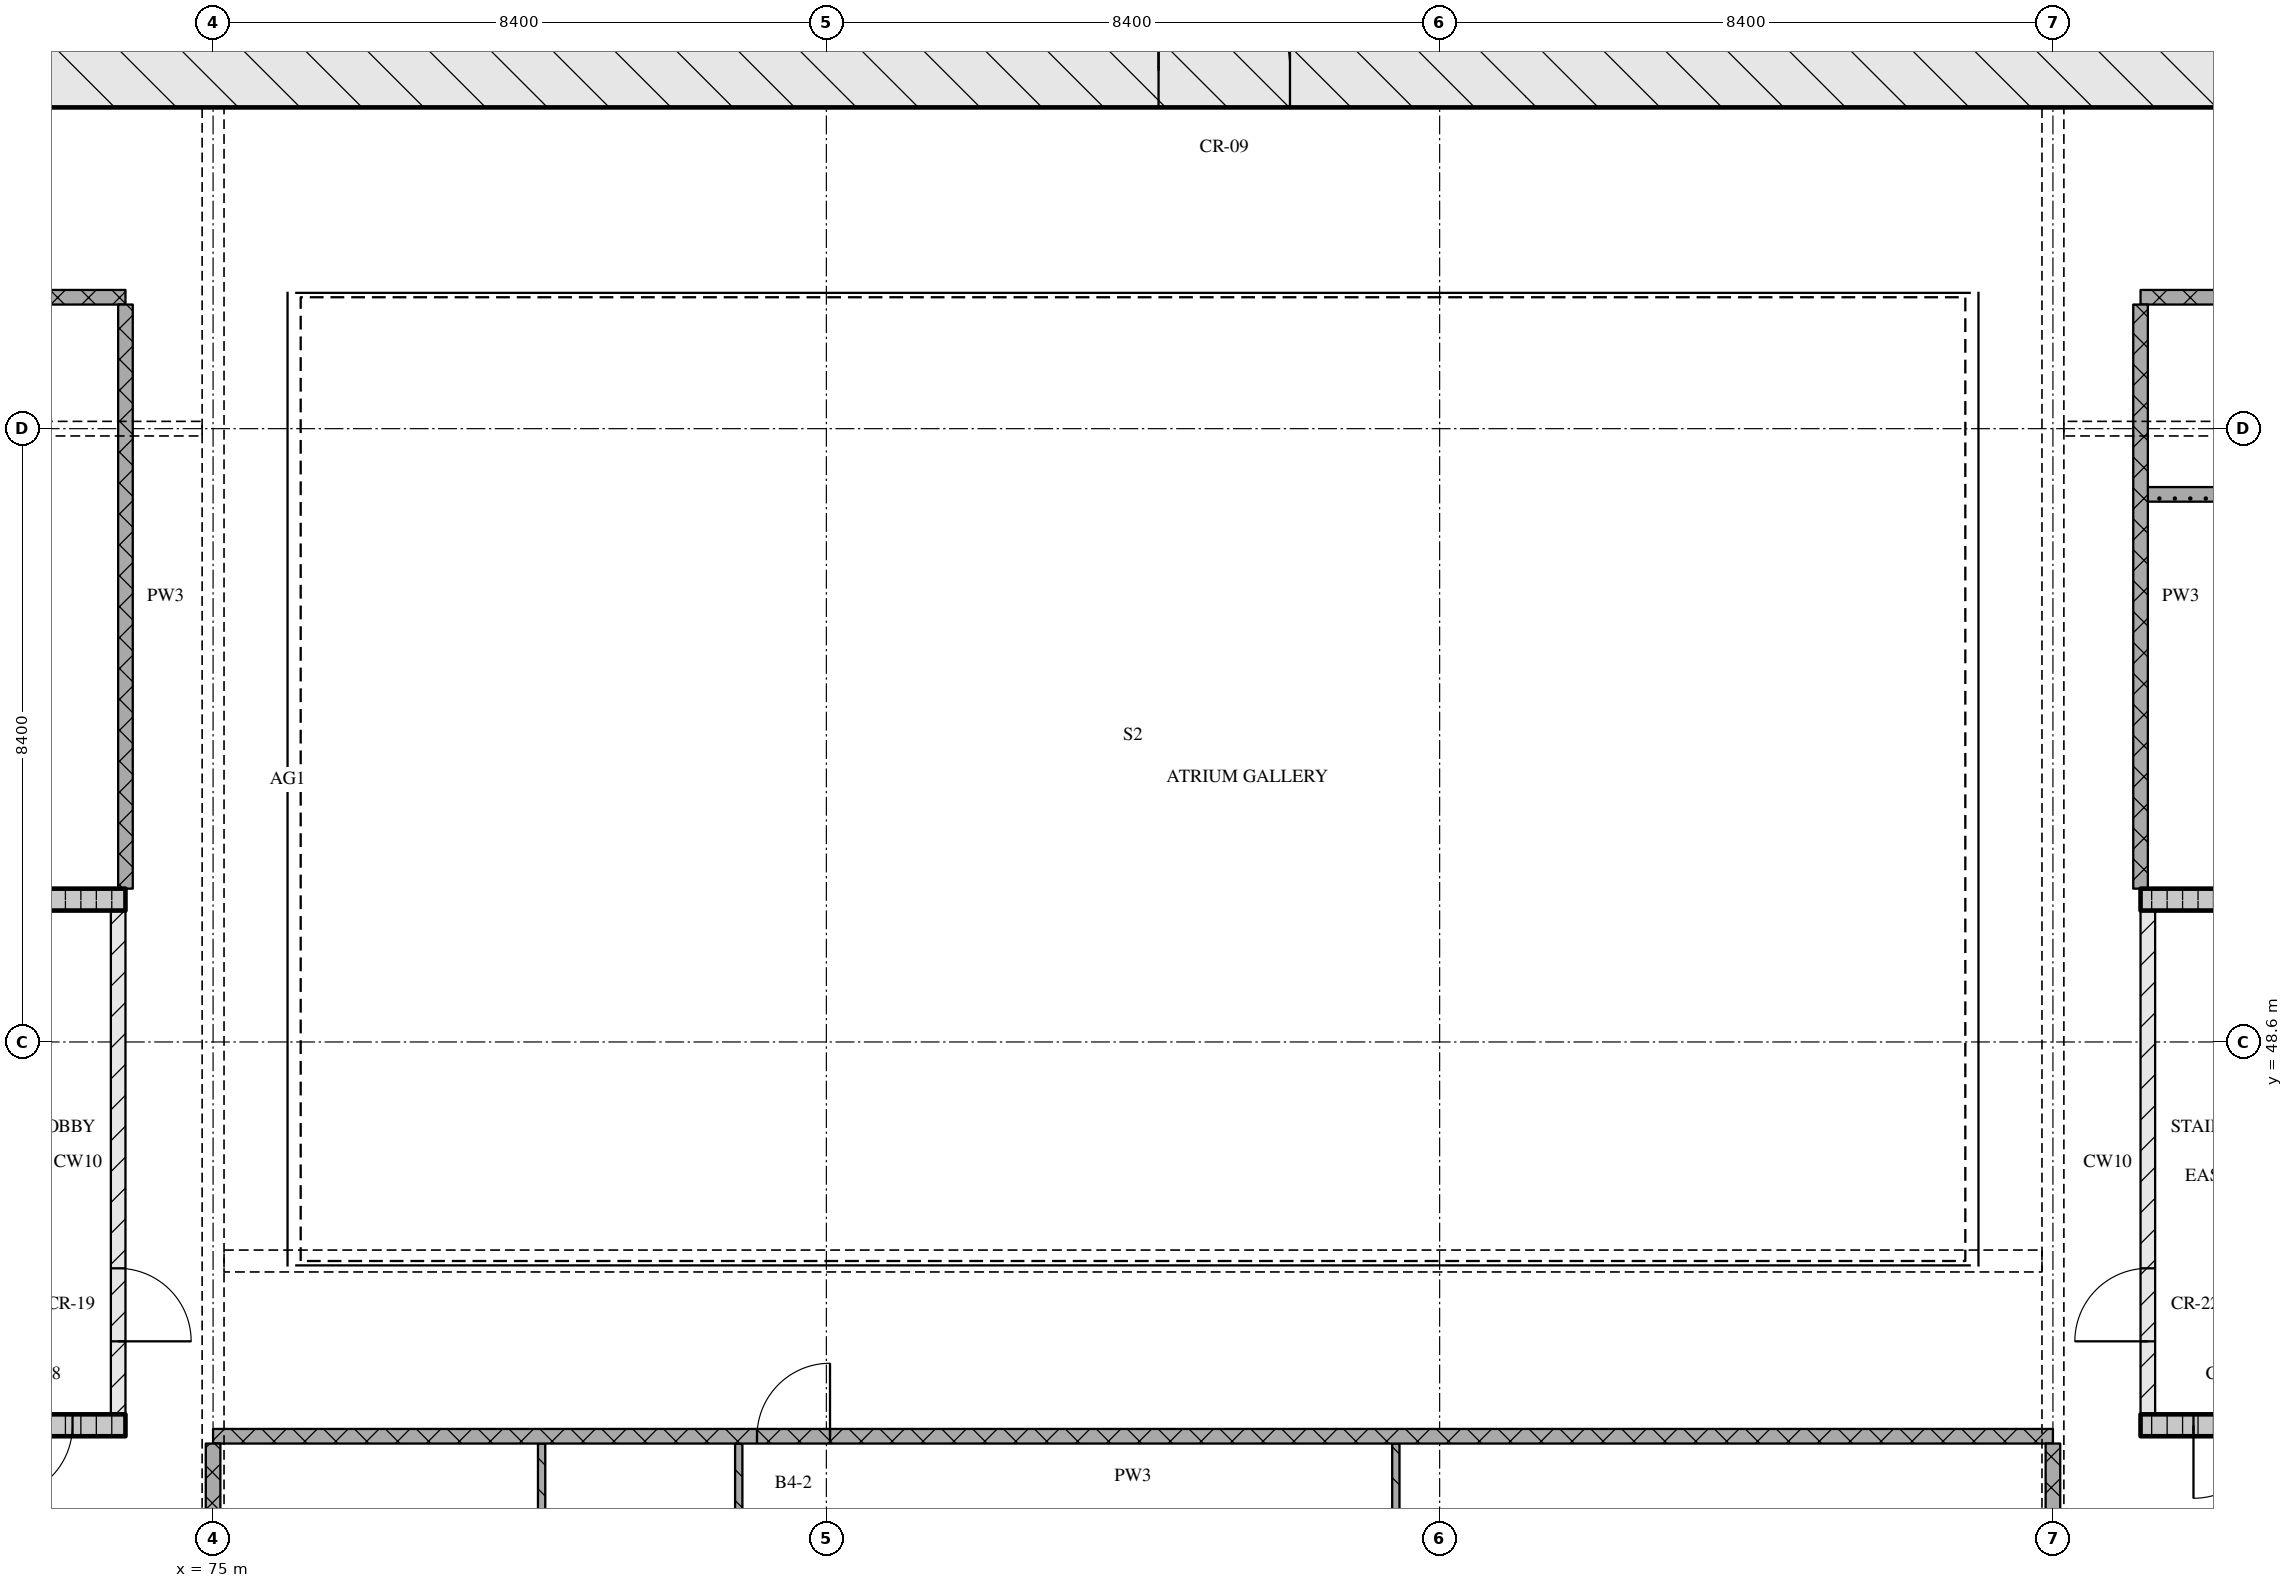
"""IFC4 building model, lengths in metres.
Left out: names, types, materials, properties, quantities, classifications, styles, units other than length and angle.
Written with IfcOpenShell. Run it as: python <this file> out.ifc"""

import sys

from ifc_helpers import new_model, si_unit, direction, frame, frame_2d, origin, place, context, subcontext, project, spatial, rectangle, extrude, element, fill, save


model = new_model("IFC4")
c1 = context("Model", 3, precision=1e-05, world=origin(), true_north=direction((0.0, 1.0)))
c2 = subcontext(c1, "Body", "Model", "MODEL_VIEW")
j1 = project(units=[si_unit("LENGTHUNIT", "METRE"), si_unit("PLANEANGLEUNIT", "RADIAN")], contexts=[c1])
p1 = place(None, origin())
s1 = spatial("IfcSite", under=j1, at=p1, CompositionType="ELEMENT")
p2 = place(p1, origin())
s2 = spatial("IfcBuilding", under=s1, at=p2, CompositionType="ELEMENT")
p3 = place(p2, frame((0.0, 0.0, 131.25)))
s3 = spatial("IfcBuildingStorey", under=s2, at=p3, CompositionType="ELEMENT", Elevation=131.25)
p4 = place(p3, frame((66.8, 61.9, 0.0), z_axis=(0.0, 0.0, 1.0), x_axis=(1.0, 0.0, 0.0)))
e1 = element("IfcWall", 1, at=p4, inside=s3, PredefinedType="SOLIDWALL", context=c2, shape_type="SweptSolid", body=[
    extrude(rectangle(XDim=41.6, YDim=1.0, at=frame_2d((20.8, 0.0))), origin(), (0.0, 0.0, 1.0), 3.32),
])
p5 = place(p4, frame((21.15, 0.0, 0.0)))
e2 = element("IfcOpeningElement", 2, at=p5, cuts=e1, PredefinedType="OPENING", context=c2, shape_type="SweptSolid", body=[
    extrude(rectangle(XDim=1.8, YDim=2.1, at=frame_2d((0.9, 1.05))), frame((0.0, 0.51, 0.0), z_axis=(0.0, -1.0, 0.0), x_axis=(1.0, 0.0, 0.0)), (0.0, 0.0, 1.0), 1.02),
])
p6 = place(p3, frame((68.2, 43.35, 0.0), z_axis=(0.0, 0.0, 1.0), x_axis=(1.0, 0.0, 0.0)))
e3 = element("IfcWall", 3, at=p6, inside=s3, PredefinedType="SOLIDWALL", context=c2, shape_type="SweptSolid", body=[
    extrude(rectangle(XDim=5.6, YDim=0.3, at=frame_2d((2.8, 0.0))), origin(), (0.0, 0.0, 1.0), 3.32),
])
p7 = place(p6, frame((3.875, 0.0, 0.0)))
e4 = element("IfcOpeningElement", 4, at=p7, cuts=e3, PredefinedType="OPENING", context=c2, shape_type="SweptSolid", body=[
    extrude(rectangle(XDim=1.0, YDim=2.1, at=frame_2d((0.5, 1.05))), frame((0.0, 0.16, 0.0), z_axis=(0.0, -1.0, 0.0), x_axis=(1.0, 0.0, 0.0)), (0.0, 0.0, 1.0), 0.32),
])
p8 = place(p3, frame((73.7, 43.5, 0.0), z_axis=(0.0, 0.0, 1.0), x_axis=(0.0, 1.0, 0.0)))
e5 = element("IfcWall", 5, at=p8, inside=s3, PredefinedType="PARTITIONING", context=c2, shape_type="SweptSolid", body=[
    extrude(rectangle(XDim=6.9, YDim=0.2, at=frame_2d((3.45, 0.0))), origin(), (0.0, 0.0, 1.0), 3.32),
])
p9 = place(p8, frame((1.0, 0.0, 0.0)))
e6 = element("IfcOpeningElement", 6, at=p9, cuts=e5, PredefinedType="OPENING", context=c2, shape_type="SweptSolid", body=[
    extrude(rectangle(XDim=1.0, YDim=2.1, at=frame_2d((0.5, 1.05))), frame((0.0, 0.11, 0.0), z_axis=(0.0, -1.0, 0.0), x_axis=(1.0, 0.0, 0.0)), (0.0, 0.0, 1.0), 0.22),
])
p10 = place(p3, frame((68.2, 50.55, 0.0), z_axis=(0.0, 0.0, 1.0), x_axis=(1.0, 0.0, 0.0)))
e7 = element("IfcWall", 7, at=p10, inside=s3, PredefinedType="SOLIDWALL", context=c2, shape_type="SweptSolid", body=[
    extrude(rectangle(XDim=5.6, YDim=0.3, at=frame_2d((2.8, 0.0))), origin(), (0.0, 0.0, 1.0), 3.32),
])
p11 = place(p3, frame((101.4, 43.35, 0.0), z_axis=(0.0, 0.0, 1.0), x_axis=(1.0, 0.0, 0.0)))
e8 = element("IfcWall", 8, at=p11, inside=s3, PredefinedType="SOLIDWALL", context=c2, shape_type="SweptSolid", body=[
    extrude(rectangle(XDim=5.6, YDim=0.3, at=frame_2d((2.8, 0.0))), origin(), (0.0, 0.0, 1.0), 3.32),
])
p12 = place(p11, frame((0.725, 0.0, 0.0)))
e9 = element("IfcOpeningElement", 9, at=p12, cuts=e8, PredefinedType="OPENING", context=c2, shape_type="SweptSolid", body=[
    extrude(rectangle(XDim=1.0, YDim=2.1, at=frame_2d((0.5, 1.05))), frame((0.0, 0.16, 0.0), z_axis=(0.0, -1.0, 0.0), x_axis=(1.0, 0.0, 0.0)), (0.0, 0.0, 1.0), 0.32),
])
p13 = place(p3, frame((101.5, 43.5, 0.0), z_axis=(0.0, 0.0, 1.0), x_axis=(0.0, 1.0, 0.0)))
e10 = element("IfcWall", 10, at=p13, inside=s3, PredefinedType="PARTITIONING", context=c2, shape_type="SweptSolid", body=[
    extrude(rectangle(XDim=6.9, YDim=0.2, at=frame_2d((3.45, 0.0))), origin(), (0.0, 0.0, 1.0), 3.32),
])
p14 = place(p13, frame((1.0, 0.0, 0.0)))
e11 = element("IfcOpeningElement", 11, at=p14, cuts=e10, PredefinedType="OPENING", context=c2, shape_type="SweptSolid", body=[
    extrude(rectangle(XDim=1.0, YDim=2.1, at=frame_2d((0.5, 1.05))), frame((0.0, 0.11, 0.0), z_axis=(0.0, -1.0, 0.0), x_axis=(1.0, 0.0, 0.0)), (0.0, 0.0, 1.0), 0.22),
])
p15 = place(p3, frame((101.4, 50.55, 0.0), z_axis=(0.0, 0.0, 1.0), x_axis=(1.0, 0.0, 0.0)))
e12 = element("IfcWall", 12, at=p15, inside=s3, PredefinedType="SOLIDWALL", context=c2, shape_type="SweptSolid", body=[
    extrude(rectangle(XDim=5.6, YDim=0.3, at=frame_2d((2.8, 0.0))), origin(), (0.0, 0.0, 1.0), 3.32),
])
p16 = place(p3, frame((100.2, 43.2, 0.0), z_axis=(0.0, 0.0, 1.0), x_axis=(-1.0, 0.0, 0.0)))
e13 = element("IfcWall", 13, at=p16, inside=s3, PredefinedType="PARTITIONING", context=c2, shape_type="SweptSolid", body=[
    extrude(rectangle(XDim=25.2, YDim=0.2, at=frame_2d((12.6, 0.0))), origin(), (0.0, 0.0, 1.0), 3.32),
])
p17 = place(p16, frame((16.75, 0.0, 0.0)))
e14 = element("IfcOpeningElement", 14, at=p17, cuts=e13, PredefinedType="OPENING", context=c2, shape_type="SweptSolid", body=[
    extrude(rectangle(XDim=1.0, YDim=2.1, at=frame_2d((0.5, 1.05))), frame((0.0, 0.11, 0.0), z_axis=(0.0, -1.0, 0.0), x_axis=(1.0, 0.0, 0.0)), (0.0, 0.0, 1.0), 0.22),
])
p18 = place(p3, frame((101.5, 56.1, 0.0), z_axis=(0.0, 0.0, 1.0), x_axis=(1.0, 0.0, 0.0)))
e15 = element("IfcWall", 15, at=p18, inside=s3, PredefinedType="PARTITIONING", context=c2, shape_type="SweptSolid", body=[
    extrude(rectangle(XDim=7.0, YDim=0.2, at=frame_2d((3.5, 0.0))), origin(), (0.0, 0.0, 1.0), 3.32),
])
p19 = place(p3, frame((73.8, 58.8, 0.0), z_axis=(0.0, 0.0, 1.0), x_axis=(-1.0, 0.0, 0.0)))
e16 = element("IfcWall", 16, at=p19, inside=s3, PredefinedType="PARTITIONING", context=c2, shape_type="SweptSolid", body=[
    extrude(rectangle(XDim=7.2, YDim=0.2, at=frame_2d((3.6, 0.0))), origin(), (0.0, 0.0, 1.0), 3.32),
])
p20 = place(p19, frame((3.0, 0.0, 0.0)))
e17 = element("IfcOpeningElement", 17, at=p20, cuts=e16, PredefinedType="OPENING", context=c2, shape_type="SweptSolid", body=[
    extrude(rectangle(XDim=1.2, YDim=2.1, at=frame_2d((0.6, 1.05))), frame((0.0, 0.11, 0.0), z_axis=(0.0, -1.0, 0.0), x_axis=(1.0, 0.0, 0.0)), (0.0, 0.0, 1.0), 0.22),
])
p21 = place(p3, frame((101.4, 58.8, 0.0), z_axis=(0.0, 0.0, 1.0), x_axis=(1.0, 0.0, 0.0)))
e18 = element("IfcWall", 18, at=p21, inside=s3, PredefinedType="PARTITIONING", context=c2, shape_type="SweptSolid", body=[
    extrude(rectangle(XDim=7.2, YDim=0.2, at=frame_2d((3.6, 0.0))), origin(), (0.0, 0.0, 1.0), 3.32),
])
p22 = place(p3, frame((73.8, 58.7, 0.0), z_axis=(0.0, 0.0, 1.0), x_axis=(0.0, -1.0, 0.0)))
e19 = element("IfcWall", 19, at=p22, inside=s3, PredefinedType="PARTITIONING", context=c2, shape_type="SweptSolid", body=[
    extrude(rectangle(XDim=8.0, YDim=0.2, at=frame_2d((4.0, 0.0))), origin(), (0.0, 0.0, 1.0), 3.32),
])
p23 = place(p3, frame((75.0, 43.1, 0.0), z_axis=(0.0, 0.0, 1.0), x_axis=(0.0, -1.0, 0.0)))
e20 = element("IfcWall", 20, at=p23, inside=s3, PredefinedType="PARTITIONING", context=c2, shape_type="SweptSolid", body=[
    extrude(rectangle(XDim=2.2, YDim=0.2, at=frame_2d((1.1, 0.0))), origin(), (0.0, 0.0, 1.0), 2.43),
])
p24 = place(p3, frame((79.5, 43.1, 0.0), z_axis=(0.0, 0.0, 1.0), x_axis=(0.0, -1.0, 0.0)))
e21 = element("IfcWall", 21, at=p24, inside=s3, PredefinedType="PARTITIONING", context=c2, shape_type="SweptSolid", body=[
    extrude(rectangle(XDim=4.35, YDim=0.1, at=frame_2d((2.175, 0.0))), origin(), (0.0, 0.0, 1.0), 3.32),
])
p25 = place(p3, frame((82.2, 38.75, 0.0), z_axis=(0.0, 0.0, 1.0), x_axis=(0.0, 1.0, 0.0)))
e22 = element("IfcWall", 22, at=p25, inside=s3, PredefinedType="PARTITIONING", context=c2, shape_type="SweptSolid", body=[
    extrude(rectangle(XDim=4.35, YDim=0.1, at=frame_2d((2.175, 0.0))), origin(), (0.0, 0.0, 1.0), 3.32),
])
p26 = place(p25, frame((1.95, 0.0, 0.0)))
e23 = element("IfcOpeningElement", 23, at=p26, cuts=e22, PredefinedType="OPENING", context=c2, shape_type="SweptSolid", body=[
    extrude(rectangle(XDim=0.8, YDim=2.1, at=frame_2d((0.4, 1.05))), frame((0.0, 0.06, 0.0), z_axis=(0.0, -1.0, 0.0), x_axis=(1.0, 0.0, 0.0)), (0.0, 0.0, 1.0), 0.12),
])
p27 = place(p3, frame((91.2, 43.1, 0.0), z_axis=(0.0, 0.0, 1.0), x_axis=(0.0, -1.0, 0.0)))
e24 = element("IfcWall", 24, at=p27, inside=s3, PredefinedType="PARTITIONING", context=c2, shape_type="SweptSolid", body=[
    extrude(rectangle(XDim=4.35, YDim=0.1, at=frame_2d((2.175, 0.0))), origin(), (0.0, 0.0, 1.0), 3.32),
])
p28 = place(p3, frame((100.2, 43.1, 0.0), z_axis=(0.0, 0.0, 1.0), x_axis=(0.0, -1.0, 0.0)))
e25 = element("IfcWall", 25, at=p28, inside=s3, PredefinedType="PARTITIONING", context=c2, shape_type="SweptSolid", body=[
    extrude(rectangle(XDim=2.2, YDim=0.2, at=frame_2d((1.1, 0.0))), origin(), (0.0, 0.0, 1.0), 2.43),
])
p29 = place(p3, frame((101.4, 58.7, 0.0), z_axis=(0.0, 0.0, 1.0), x_axis=(0.0, -1.0, 0.0)))
e26 = element("IfcWall", 26, at=p29, inside=s3, PredefinedType="PARTITIONING", context=c2, shape_type="SweptSolid", body=[
    extrude(rectangle(XDim=8.0, YDim=0.2, at=frame_2d((4.0, 0.0))), origin(), (0.0, 0.0, 1.0), 3.32),
])
p30 = place(p5, origin())
e27 = element("IfcDoor", 27, at=p30, inside=s3, OperationType="DOUBLE_DOOR_SINGLE_SWING", PredefinedType="DOOR", context=c2, shape_type="SweptSolid", body=[
    extrude(rectangle(XDim=1.8, YDim=2.1, at=frame_2d((0.9, 1.05))), frame((0.0, 0.025, 0.0), z_axis=(0.0, -1.0, 0.0), x_axis=(1.0, 0.0, 0.0)), (0.0, 0.0, 1.0), 0.05),
])
fill(e2, e27)
p31 = place(p7, origin())
e28 = element("IfcDoor", 28, at=p31, inside=s3, OperationType="SINGLE_SWING_RIGHT", PredefinedType="DOOR", context=c2, shape_type="SweptSolid", body=[
    extrude(rectangle(XDim=1.0, YDim=2.1, at=frame_2d((0.5, 1.05))), frame((0.0, 0.025, 0.0), z_axis=(0.0, -1.0, 0.0), x_axis=(1.0, 0.0, 0.0)), (0.0, 0.0, 1.0), 0.05),
])
fill(e4, e28)
p32 = place(p9, origin())
e29 = element("IfcDoor", 29, at=p32, inside=s3, OperationType="SINGLE_SWING_RIGHT", PredefinedType="DOOR", context=c2, shape_type="SweptSolid", body=[
    extrude(rectangle(XDim=1.0, YDim=2.1, at=frame_2d((0.5, 1.05))), frame((0.0, 0.025, 0.0), z_axis=(0.0, -1.0, 0.0), x_axis=(1.0, 0.0, 0.0)), (0.0, 0.0, 1.0), 0.05),
])
fill(e6, e29)
p33 = place(p12, origin())
e30 = element("IfcDoor", 30, at=p33, inside=s3, OperationType="SINGLE_SWING_RIGHT", PredefinedType="DOOR", context=c2, shape_type="SweptSolid", body=[
    extrude(rectangle(XDim=1.0, YDim=2.1, at=frame_2d((0.5, 1.05))), frame((0.0, 0.025, 0.0), z_axis=(0.0, -1.0, 0.0), x_axis=(1.0, 0.0, 0.0)), (0.0, 0.0, 1.0), 0.05),
])
fill(e9, e30)
p34 = place(p14, origin())
e31 = element("IfcDoor", 31, at=p34, inside=s3, OperationType="SINGLE_SWING_LEFT", PredefinedType="DOOR", context=c2, shape_type="SweptSolid", body=[
    extrude(rectangle(XDim=1.0, YDim=2.1, at=frame_2d((0.5, 1.05))), frame((0.0, 0.025, 0.0), z_axis=(0.0, -1.0, 0.0), x_axis=(1.0, 0.0, 0.0)), (0.0, 0.0, 1.0), 0.05),
])
fill(e11, e31)
p35 = place(p17, origin())
e32 = element("IfcDoor", 32, at=p35, inside=s3, OperationType="SINGLE_SWING_RIGHT", PredefinedType="DOOR", context=c2, shape_type="SweptSolid", body=[
    extrude(rectangle(XDim=1.0, YDim=2.1, at=frame_2d((0.5, 1.05))), frame((0.0, 0.025, 0.0), z_axis=(0.0, -1.0, 0.0), x_axis=(1.0, 0.0, 0.0)), (0.0, 0.0, 1.0), 0.05),
])
fill(e14, e32)
save(model, sys.argv[1])
